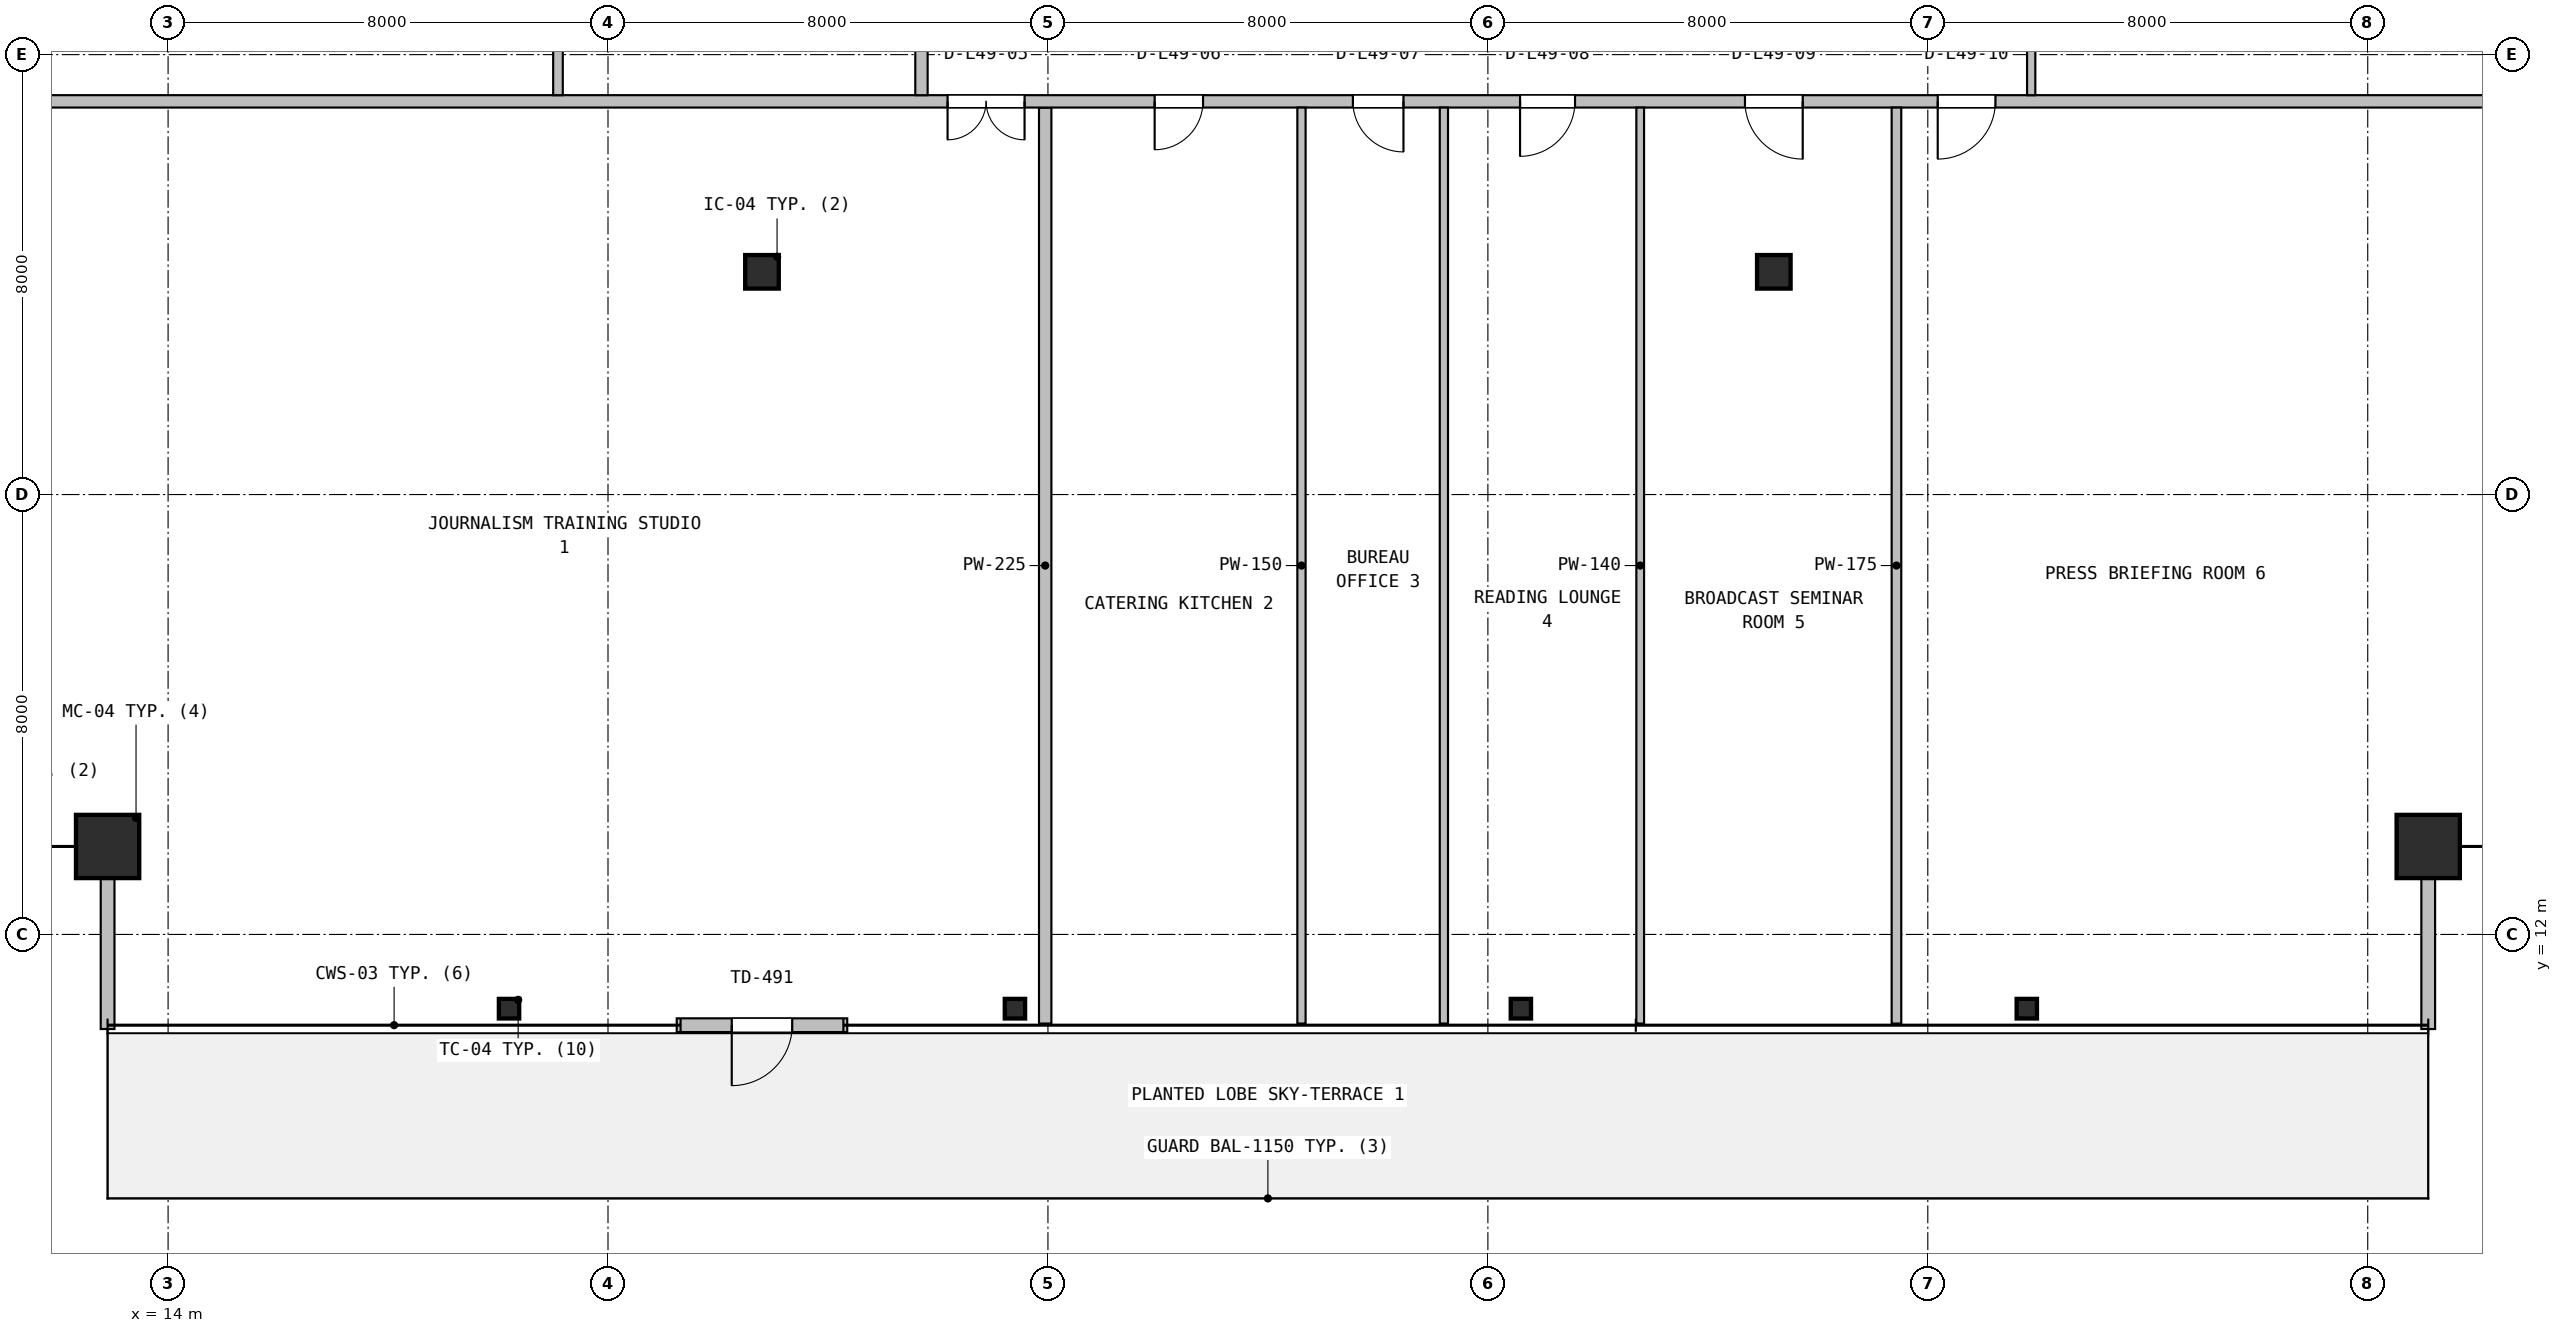
"""IFC4 building model, lengths in metres.
Left out: names, types, materials, properties, quantities, classifications, styles, units other than length and angle.
Written with IfcOpenShell. Run it as: python <this file> out.ifc"""

import sys

from ifc_helpers import new_model, si_unit, direction, frame, frame_2d, origin, origin_2d, place, context, subcontext, project, spatial, rectangle, hollow_rectangle, hollow_circle, i_section, extrude, source, transform, mapped, element, fill, save


model = new_model("IFC4")
c1 = context("Model", 3, precision=1e-05, world=origin(), true_north=direction((0.0, 1.0)))
c2 = subcontext(c1, "Body", "Model", "MODEL_VIEW")
j1 = project(units=[si_unit("LENGTHUNIT", "METRE"), si_unit("PLANEANGLEUNIT", "RADIAN")], contexts=[c1])
p1 = place(None, origin())
s1 = spatial("IfcSite", under=j1, at=p1, CompositionType="ELEMENT")
p2 = place(p1, origin())
s2 = spatial("IfcBuilding", under=s1, at=p2, CompositionType="ELEMENT")
p3 = place(p2, frame((0.0, 0.0, 199.8)))
s3 = spatial("IfcBuildingStorey", under=s2, at=p3, CompositionType="ELEMENT", Elevation=199.8)
m1 = source(origin(), c2, "Body", "SweptSolid", [
    extrude(hollow_rectangle(XDim=1.15, YDim=1.15, WallThickness=0.045, at=origin_2d()), origin(), (0.0, 0.0, 1.0), 3.8),
])
for number, where, z_axis, x_axis in (
    (1, (12.9, 13.6, 0.0), (0.0, 0.0, 1.0), (1.0, 0.0, 0.0)),
    (2, (55.1, 13.6, 0.0), (0.0, 0.0, 1.0), (1.0, 0.0, 0.0)),
):
    element("IfcColumn", number, at=place(p3, frame(where, z_axis=z_axis, x_axis=x_axis)), inside=s3, PredefinedType="COLUMN", context=c2, shape_type="MappedRepresentation", body=[
        mapped(m1, transform((0.0, 0.0, 0.0), x_axis=(1.0, 0.0, 0.0), y_axis=(0.0, 1.0, 0.0), z_axis=(0.0, 0.0, 1.0), scale=1.0)),
    ])
m2 = source(origin(), c2, "Body", "SweptSolid", [
    extrude(i_section(OverallWidth=0.369, OverallDepth=0.356, WebThickness=0.011, FlangeThickness=0.018, FilletRadius=0.016, at=origin_2d()), origin(), (0.0, 0.0, 1.0), 3.8),
])
for number, where, z_axis, x_axis in (
    (3, (20.2, 10.65, 0.0), (0.0, 0.0, 1.0), (1.0, 0.0, 0.0)),
    (4, (29.4, 10.65, 0.0), (0.0, 0.0, 1.0), (1.0, 0.0, 0.0)),
    (5, (38.6, 10.65, 0.0), (0.0, 0.0, 1.0), (1.0, 0.0, 0.0)),
    (6, (47.8, 10.65, 0.0), (0.0, 0.0, 1.0), (1.0, 0.0, 0.0)),
):
    element("IfcColumn", number, at=place(p3, frame(where, z_axis=z_axis, x_axis=x_axis)), inside=s3, PredefinedType="COLUMN", context=c2, shape_type="MappedRepresentation", body=[
        mapped(m2, transform((0.0, 0.0, 0.0), x_axis=(1.0, 0.0, 0.0), y_axis=(0.0, 1.0, 0.0), z_axis=(0.0, 0.0, 1.0), scale=1.0)),
    ])
m3 = source(origin(), c2, "Body", "SweptSolid", [
    extrude(hollow_circle(Radius=0.305, WallThickness=0.025, at=origin_2d()), origin(), (0.0, 0.0, 1.0), 3.8),
])
for number, where, z_axis, x_axis in (
    (7, (24.8, 24.05, 0.0), (0.0, 0.0, 1.0), (1.0, 0.0, 0.0)),
    (8, (43.2, 24.05, 0.0), (0.0, 0.0, 1.0), (1.0, 0.0, 0.0)),
):
    element("IfcColumn", number, at=place(p3, frame(where, z_axis=z_axis, x_axis=x_axis)), inside=s3, PredefinedType="COLUMN", context=c2, shape_type="MappedRepresentation", body=[
        mapped(m3, transform((0.0, 0.0, 0.0), x_axis=(1.0, 0.0, 0.0), y_axis=(0.0, 1.0, 0.0), z_axis=(0.0, 0.0, 1.0), scale=1.0)),
    ])
p4 = place(p3, frame((23.25, 10.35, 0.0), z_axis=(0.0, 0.0, 1.0), x_axis=(1.0, 0.0, 0.0)))
e9 = element("IfcWall", 9, at=p4, inside=s3, PredefinedType="SOLIDWALL", context=c2, shape_type="SweptSolid", body=[
    extrude(rectangle(XDim=3.1, YDim=0.25, at=frame_2d((1.55, 0.0))), origin(), (0.0, 0.0, 1.0), 3.53),
])
p5 = place(p4, frame((1.0, 0.0, 0.0)))
e10 = element("IfcOpeningElement", 10, at=p5, cuts=e9, PredefinedType="OPENING", context=c2, shape_type="SweptSolid", body=[
    extrude(rectangle(XDim=1.1, YDim=2.15, at=frame_2d((0.55, 1.075))), frame((0.0, 0.135, 0.0), z_axis=(0.0, -1.0, 0.0), x_axis=(1.0, 0.0, 0.0)), (0.0, 0.0, 1.0), 0.27),
])
for number, where, z_axis, x_axis in (
    (11, (12.9, 10.28, 0.0), (0.0, 0.0, 1.0), (0.0, 1.0, 0.0)),
    (12, (55.1, 10.28, 0.0), (0.0, 0.0, 1.0), (0.0, 1.0, 0.0)),
):
    element("IfcWall", number, at=place(p3, frame(where, z_axis=z_axis, x_axis=x_axis)), inside=s3, PredefinedType="SOLIDWALL", context=c2, shape_type="SweptSolid", body=[
        extrude(rectangle(XDim=3.4, YDim=0.25, at=frame_2d((1.7, 0.0))), origin(), (0.0, 0.0, 1.0), 3.171),
    ])
p6 = place(p3, frame((29.95, 10.38, 0.0), z_axis=(0.0, 0.0, 1.0), x_axis=(0.0, 1.0, 0.0)))
e13 = element("IfcWall", 13, at=p6, inside=s3, PredefinedType="PARTITIONING", context=c2, shape_type="SweptSolid", body=[
    extrude(rectangle(XDim=16.657, YDim=0.225, at=frame_2d((8.329, 0.0))), origin(), (0.0, 0.0, 1.0), 2.908),
])
p7 = place(p3, frame((9.68, 27.15, 0.0), z_axis=(0.0, 0.0, 1.0), x_axis=(1.0, 0.0, 0.0)))
e14 = element("IfcWall", 14, at=p7, inside=s3, PredefinedType="PARTITIONING", context=c2, shape_type="SweptSolid", body=[
    extrude(rectangle(XDim=48.64, YDim=0.225, at=frame_2d((24.32, 0.0))), origin(), (0.0, 0.0, 1.0), 2.908),
])
p8 = place(p7, frame((18.495, 0.0, 0.0)))
e15 = element("IfcOpeningElement", 15, at=p8, cuts=e14, PredefinedType="OPENING", context=c2, shape_type="SweptSolid", body=[
    extrude(rectangle(XDim=1.4, YDim=2.12, at=frame_2d((0.7, 1.06))), frame((0.0, 0.123, 0.0), z_axis=(0.0, -1.0, 0.0), x_axis=(1.0, 0.0, 0.0)), (0.0, 0.0, 1.0), 0.245),
])
p9 = place(p7, frame((22.26, 0.0, 0.0)))
e16 = element("IfcOpeningElement", 16, at=p9, cuts=e14, PredefinedType="OPENING", context=c2, shape_type="SweptSolid", body=[
    extrude(rectangle(XDim=0.88, YDim=2.06, at=frame_2d((0.44, 1.03))), frame((0.0, 0.123, 0.0), z_axis=(0.0, -1.0, 0.0), x_axis=(1.0, 0.0, 0.0)), (0.0, 0.0, 1.0), 0.245),
])
p10 = place(p7, frame((25.865, 0.0, 0.0)))
e17 = element("IfcOpeningElement", 17, at=p10, cuts=e14, PredefinedType="OPENING", context=c2, shape_type="SweptSolid", body=[
    extrude(rectangle(XDim=0.92, YDim=2.08, at=frame_2d((0.46, 1.04))), frame((0.0, 0.123, 0.0), z_axis=(0.0, -1.0, 0.0), x_axis=(1.0, 0.0, 0.0)), (0.0, 0.0, 1.0), 0.245),
])
p11 = place(p7, frame((28.905, 0.0, 0.0)))
e18 = element("IfcOpeningElement", 18, at=p11, cuts=e14, PredefinedType="OPENING", context=c2, shape_type="SweptSolid", body=[
    extrude(rectangle(XDim=1.0, YDim=2.1, at=frame_2d((0.5, 1.05))), frame((0.0, 0.123, 0.0), z_axis=(0.0, -1.0, 0.0), x_axis=(1.0, 0.0, 0.0)), (0.0, 0.0, 1.0), 0.245),
])
p12 = place(p7, frame((32.995, 0.0, 0.0)))
e19 = element("IfcOpeningElement", 19, at=p12, cuts=e14, PredefinedType="OPENING", context=c2, shape_type="SweptSolid", body=[
    extrude(rectangle(XDim=1.05, YDim=2.1, at=frame_2d((0.525, 1.05))), frame((0.0, 0.123, 0.0), z_axis=(0.0, -1.0, 0.0), x_axis=(1.0, 0.0, 0.0)), (0.0, 0.0, 1.0), 0.245),
])
p13 = place(p7, frame((36.5, 0.0, 0.0)))
e20 = element("IfcOpeningElement", 20, at=p13, cuts=e14, PredefinedType="OPENING", context=c2, shape_type="SweptSolid", body=[
    extrude(rectangle(XDim=1.05, YDim=2.1, at=frame_2d((0.525, 1.05))), frame((0.0, 0.123, 0.0), z_axis=(0.0, -1.0, 0.0), x_axis=(1.0, 0.0, 0.0)), (0.0, 0.0, 1.0), 0.245),
])
for number, where, z_axis, x_axis in (
    (21, (34.61, 10.38, 0.0), (0.0, 0.0, 1.0), (0.0, 1.0, 0.0)),
    (22, (37.2, 10.38, 0.0), (0.0, 0.0, 1.0), (0.0, 1.0, 0.0)),
):
    element("IfcWall", number, at=place(p3, frame(where, z_axis=z_axis, x_axis=x_axis)), inside=s3, PredefinedType="PARTITIONING", context=c2, shape_type="SweptSolid", body=[
        extrude(rectangle(XDim=16.657, YDim=0.15, at=frame_2d((8.329, 0.0))), origin(), (0.0, 0.0, 1.0), 2.908),
    ])
p14 = place(p3, frame((40.77, 10.38, 0.0), z_axis=(0.0, 0.0, 1.0), x_axis=(0.0, 1.0, 0.0)))
e23 = element("IfcWall", 23, at=p14, inside=s3, PredefinedType="PARTITIONING", context=c2, shape_type="SweptSolid", body=[
    extrude(rectangle(XDim=16.657, YDim=0.14, at=frame_2d((8.329, 0.0))), origin(), (0.0, 0.0, 1.0), 2.908),
])
p15 = place(p3, frame((45.43, 10.38, 0.0), z_axis=(0.0, 0.0, 1.0), x_axis=(0.0, 1.0, 0.0)))
e24 = element("IfcWall", 24, at=p15, inside=s3, PredefinedType="PARTITIONING", context=c2, shape_type="SweptSolid", body=[
    extrude(rectangle(XDim=16.657, YDim=0.175, at=frame_2d((8.329, 0.0))), origin(), (0.0, 0.0, 1.0), 2.908),
])
p16 = place(p3, frame((21.09, 27.262, 0.0), z_axis=(0.0, 0.0, 1.0), x_axis=(0.0, 1.0, 0.0)))
e25 = element("IfcWall", 25, at=p16, inside=s3, PredefinedType="PARTITIONING", context=c2, shape_type="SweptSolid", body=[
    extrude(rectangle(XDim=6.001, YDim=0.175, at=frame_2d((3.0, 0.0))), origin(), (0.0, 0.0, 1.0), 3.222),
])
p17 = place(p3, frame((27.7, 27.262, 0.0), z_axis=(0.0, 0.0, 1.0), x_axis=(0.0, 1.0, 0.0)))
e26 = element("IfcWall", 26, at=p17, inside=s3, PredefinedType="PARTITIONING", context=c2, shape_type="SweptSolid", body=[
    extrude(rectangle(XDim=6.001, YDim=0.225, at=frame_2d((3.0, 0.0))), origin(), (0.0, 0.0, 1.0), 3.222),
])
p18 = place(p3, frame((47.88, 27.262, 0.0), z_axis=(0.0, 0.0, 1.0), x_axis=(0.0, 1.0, 0.0)))
e27 = element("IfcWall", 27, at=p18, inside=s3, PredefinedType="PARTITIONING", context=c2, shape_type="SweptSolid", body=[
    extrude(rectangle(XDim=6.013, YDim=0.15, at=frame_2d((3.006, 0.0))), origin(), (0.0, 0.0, 1.0), 3.222),
])
m4 = source(origin(), c2, "Body", "SweptSolid", [
    extrude(rectangle(XDim=1.1, YDim=2.15, at=frame_2d((0.55, 1.075))), frame((0.0, 0.025, 0.0), z_axis=(0.0, -1.0, 0.0), x_axis=(1.0, 0.0, 0.0)), (0.0, 0.0, 1.0), 0.05),
])
p19 = place(p5, frame((1.1, 0.0, 0.0), z_axis=(0.0, 0.0, 1.0), x_axis=(-1.0, 0.0, 0.0)))
e28 = element("IfcDoor", 28, at=p19, inside=s3, OperationType="SINGLE_SWING_LEFT", PredefinedType="DOOR", context=c2, shape_type="MappedRepresentation", body=[
    mapped(m4, transform((0.0, 0.0, 0.0), x_axis=(1.0, 0.0, 0.0), y_axis=(0.0, 1.0, 0.0), z_axis=(0.0, 0.0, 1.0), scale=1.0)),
])
fill(e10, e28)
m5 = source(origin(), c2, "Body", "SweptSolid", [
    extrude(rectangle(XDim=1.4, YDim=2.12, at=frame_2d((0.7, 1.06))), frame((0.0, 0.025, 0.0), z_axis=(0.0, -1.0, 0.0), x_axis=(1.0, 0.0, 0.0)), (0.0, 0.0, 1.0), 0.05),
])
p20 = place(p8, frame((1.4, 0.0, 0.0), z_axis=(0.0, 0.0, 1.0), x_axis=(-1.0, 0.0, 0.0)))
e29 = element("IfcDoor", 29, at=p20, inside=s3, OperationType="DOUBLE_DOOR_SINGLE_SWING", PredefinedType="DOOR", context=c2, shape_type="MappedRepresentation", body=[
    mapped(m5, transform((0.0, 0.0, 0.0), x_axis=(1.0, 0.0, 0.0), y_axis=(0.0, 1.0, 0.0), z_axis=(0.0, 0.0, 1.0), scale=1.0)),
])
fill(e15, e29)
m6 = source(origin(), c2, "Body", "SweptSolid", [
    extrude(rectangle(XDim=0.88, YDim=2.06, at=frame_2d((0.44, 1.03))), frame((0.0, 0.025, 0.0), z_axis=(0.0, -1.0, 0.0), x_axis=(1.0, 0.0, 0.0)), (0.0, 0.0, 1.0), 0.05),
])
p21 = place(p9, frame((0.88, 0.0, 0.0), z_axis=(0.0, 0.0, 1.0), x_axis=(-1.0, 0.0, 0.0)))
e30 = element("IfcDoor", 30, at=p21, inside=s3, OperationType="SINGLE_SWING_LEFT", PredefinedType="DOOR", context=c2, shape_type="MappedRepresentation", body=[
    mapped(m6, transform((0.0, 0.0, 0.0), x_axis=(1.0, 0.0, 0.0), y_axis=(0.0, 1.0, 0.0), z_axis=(0.0, 0.0, 1.0), scale=1.0)),
])
fill(e16, e30)
m7 = source(origin(), c2, "Body", "SweptSolid", [
    extrude(rectangle(XDim=0.92, YDim=2.08, at=frame_2d((0.46, 1.04))), frame((0.0, 0.025, 0.0), z_axis=(0.0, -1.0, 0.0), x_axis=(1.0, 0.0, 0.0)), (0.0, 0.0, 1.0), 0.05),
])
p22 = place(p10, frame((0.92, 0.0, 0.0), z_axis=(0.0, 0.0, 1.0), x_axis=(-1.0, 0.0, 0.0)))
e31 = element("IfcDoor", 31, at=p22, inside=s3, OperationType="SINGLE_SWING_RIGHT", PredefinedType="DOOR", context=c2, shape_type="MappedRepresentation", body=[
    mapped(m7, transform((0.0, 0.0, 0.0), x_axis=(1.0, 0.0, 0.0), y_axis=(0.0, 1.0, 0.0), z_axis=(0.0, 0.0, 1.0), scale=1.0)),
])
fill(e17, e31)
m8 = source(origin(), c2, "Body", "SweptSolid", [
    extrude(rectangle(XDim=1.0, YDim=2.1, at=frame_2d((0.5, 1.05))), frame((0.0, 0.025, 0.0), z_axis=(0.0, -1.0, 0.0), x_axis=(1.0, 0.0, 0.0)), (0.0, 0.0, 1.0), 0.05),
])
p23 = place(p11, frame((1.0, 0.0, 0.0), z_axis=(0.0, 0.0, 1.0), x_axis=(-1.0, 0.0, 0.0)))
e32 = element("IfcDoor", 32, at=p23, inside=s3, OperationType="SINGLE_SWING_LEFT", PredefinedType="DOOR", context=c2, shape_type="MappedRepresentation", body=[
    mapped(m8, transform((0.0, 0.0, 0.0), x_axis=(1.0, 0.0, 0.0), y_axis=(0.0, 1.0, 0.0), z_axis=(0.0, 0.0, 1.0), scale=1.0)),
])
fill(e18, e32)
m9 = source(origin(), c2, "Body", "SweptSolid", [
    extrude(rectangle(XDim=1.05, YDim=2.1, at=frame_2d((0.525, 1.05))), frame((0.0, 0.025, 0.0), z_axis=(0.0, -1.0, 0.0), x_axis=(1.0, 0.0, 0.0)), (0.0, 0.0, 1.0), 0.05),
])
p24 = place(p12, frame((1.05, 0.0, 0.0), z_axis=(0.0, 0.0, 1.0), x_axis=(-1.0, 0.0, 0.0)))
e33 = element("IfcDoor", 33, at=p24, inside=s3, OperationType="SINGLE_SWING_RIGHT", PredefinedType="DOOR", context=c2, shape_type="MappedRepresentation", body=[
    mapped(m9, transform((0.0, 0.0, 0.0), x_axis=(1.0, 0.0, 0.0), y_axis=(0.0, 1.0, 0.0), z_axis=(0.0, 0.0, 1.0), scale=1.0)),
])
fill(e19, e33)
p25 = place(p13, frame((1.05, 0.0, 0.0), z_axis=(0.0, 0.0, 1.0), x_axis=(-1.0, 0.0, 0.0)))
e34 = element("IfcDoor", 34, at=p25, inside=s3, OperationType="SINGLE_SWING_LEFT", PredefinedType="DOOR", context=c2, shape_type="MappedRepresentation", body=[
    mapped(m9, transform((0.0, 0.0, 0.0), x_axis=(1.0, 0.0, 0.0), y_axis=(0.0, 1.0, 0.0), z_axis=(0.0, 0.0, 1.0), scale=1.0)),
])
fill(e20, e34)
save(model, sys.argv[1])
